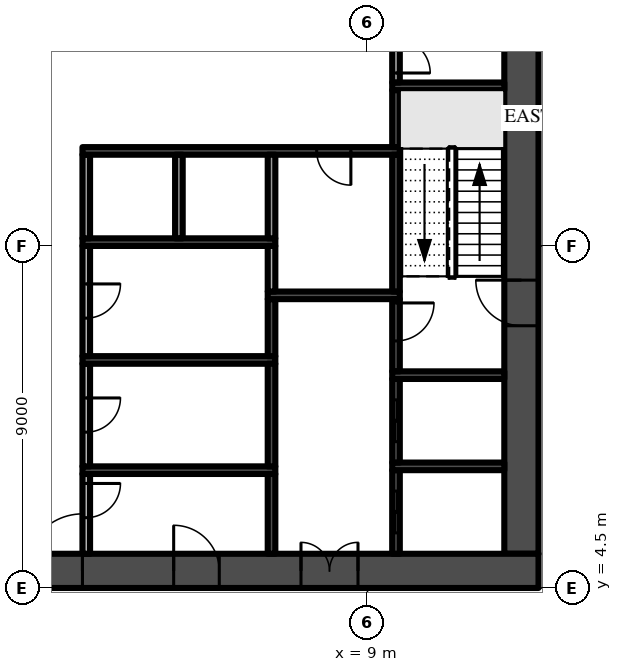
"""IFC4 building model, lengths in metres.
Left out: names, types, materials, properties, quantities, classifications, styles, units other than length and angle.
Written with IfcOpenShell. Run it as: python <this file> out.ifc"""

import sys

from ifc_helpers import new_model, si_unit, direction, frame, frame_2d, origin, place, context, subcontext, project, spatial, rectangle, extrude, element, fill, save


model = new_model("IFC4")
c1 = context("Model", 3, precision=1e-05, world=origin(), true_north=direction((0.0, 1.0)))
c2 = subcontext(c1, "Body", "Model", "MODEL_VIEW")
j1 = project(units=[si_unit("LENGTHUNIT", "METRE"), si_unit("PLANEANGLEUNIT", "RADIAN")], contexts=[c1])
p1 = place(None, origin())
s1 = spatial("IfcSite", under=j1, at=p1, CompositionType="ELEMENT")
p2 = place(p1, origin())
s2 = spatial("IfcBuilding", under=s1, at=p2, CompositionType="ELEMENT")
p3 = place(p2, frame((0.0, 0.0, 6.0)))
s3 = spatial("IfcBuildingStorey", under=s2, at=p3, CompositionType="ELEMENT", Elevation=6.0)
p4 = place(p3, frame((-13.5, 4.95, -0.4), z_axis=(0.0, 0.0, 1.0), x_axis=(1.0, 0.0, 0.0)))
e1 = element("IfcWall", 1, at=p4, inside=s3, PredefinedType="SHEAR", context=c2, shape_type="SweptSolid", body=[
    extrude(rectangle(XDim=27.0, YDim=0.9, at=frame_2d((13.5, 0.0))), origin(), (0.0, 0.0, 1.0), 4.55),
])
p5 = place(p4, frame((12.0, 0.0, 0.4)))
e2 = element("IfcOpeningElement", 2, at=p5, cuts=e1, PredefinedType="OPENING", context=c2, shape_type="SweptSolid", body=[
    extrude(rectangle(XDim=3.0, YDim=2.4, at=frame_2d((1.5, 1.2))), frame((0.0, 0.46, 0.0), z_axis=(0.0, -1.0, 0.0), x_axis=(1.0, 0.0, 0.0)), (0.0, 0.0, 1.0), 0.92),
])
p6 = place(p4, frame((4.9, 0.0, 0.4)))
e3 = element("IfcOpeningElement", 3, at=p6, cuts=e1, PredefinedType="OPENING", context=c2, shape_type="SweptSolid", body=[
    extrude(rectangle(XDim=1.2, YDim=2.2, at=frame_2d((0.6, 1.1))), frame((0.0, 0.46, 0.0), z_axis=(0.0, -1.0, 0.0), x_axis=(1.0, 0.0, 0.0)), (0.0, 0.0, 1.0), 0.92),
])
p7 = place(p4, frame((20.75, 0.0, 0.4)))
e4 = element("IfcOpeningElement", 4, at=p7, cuts=e1, PredefinedType="OPENING", context=c2, shape_type="SweptSolid", body=[
    extrude(rectangle(XDim=1.5, YDim=2.2, at=frame_2d((0.75, 1.1))), frame((0.0, 0.46, 0.0), z_axis=(0.0, -1.0, 0.0), x_axis=(1.0, 0.0, 0.0)), (0.0, 0.0, 1.0), 0.92),
])
p8 = place(p4, frame((17.4, 0.0, 0.4)))
e5 = element("IfcOpeningElement", 5, at=p8, cuts=e1, PredefinedType="OPENING", context=c2, shape_type="SweptSolid", body=[
    extrude(rectangle(XDim=1.2, YDim=2.2, at=frame_2d((0.6, 1.1))), frame((0.0, 0.46, 0.0), z_axis=(0.0, -1.0, 0.0), x_axis=(1.0, 0.0, 0.0)), (0.0, 0.0, 1.0), 0.92),
])
p9 = place(p3, frame((13.05, 5.4, -0.4), z_axis=(0.0, 0.0, 1.0), x_axis=(0.0, 1.0, 0.0)))
e6 = element("IfcWall", 6, at=p9, inside=s3, PredefinedType="SHEAR", context=c2, shape_type="SweptSolid", body=[
    extrude(rectangle(XDim=16.2, YDim=0.9, at=frame_2d((8.1, 0.0))), origin(), (0.0, 0.0, 1.0), 4.55),
])
p10 = place(p9, frame((6.0, 0.0, 0.4)))
e7 = element("IfcOpeningElement", 7, at=p10, cuts=e6, PredefinedType="OPENING", context=c2, shape_type="SweptSolid", body=[
    extrude(rectangle(XDim=1.2, YDim=2.2, at=frame_2d((0.6, 1.1))), frame((0.0, 0.46, 0.0), z_axis=(0.0, -1.0, 0.0), x_axis=(1.0, 0.0, 0.0)), (0.0, 0.0, 1.0), 0.92),
])
p11 = place(p3, frame((1.6, 7.5, 0.0), z_axis=(0.0, 0.0, 1.0), x_axis=(0.0, -1.0, 0.0)))
e8 = element("IfcWall", 8, at=p11, inside=s3, PredefinedType="PARTITIONING", context=c2, shape_type="SweptSolid", body=[
    extrude(rectangle(XDim=2.1, YDim=0.2, at=frame_2d((1.05, 0.0))), origin(), (0.0, 0.0, 1.0), 4.15),
])
p12 = place(p11, frame((0.25, 0.0, 0.0)))
e9 = element("IfcOpeningElement", 9, at=p12, cuts=e8, PredefinedType="OPENING", context=c2, shape_type="SweptSolid", body=[
    extrude(rectangle(XDim=0.9, YDim=2.1, at=frame_2d((0.45, 1.05))), frame((0.0, 0.11, 0.0), z_axis=(0.0, -1.0, 0.0), x_axis=(1.0, 0.0, 0.0)), (0.0, 0.0, 1.0), 0.22),
])
p13 = place(p3, frame((1.5, 7.6, 0.0), z_axis=(0.0, 0.0, 1.0), x_axis=(1.0, 0.0, 0.0)))
e10 = element("IfcWall", 10, at=p13, inside=s3, PredefinedType="SHEAR", context=c2, shape_type="SweptSolid", body=[
    extrude(rectangle(XDim=5.075, YDim=0.2, at=frame_2d((2.538, 0.0))), origin(), (0.0, 0.0, 1.0), 4.15),
])
p14 = place(p3, frame((1.6, 10.4, 0.0), z_axis=(0.0, 0.0, 1.0), x_axis=(0.0, -1.0, 0.0)))
e11 = element("IfcWall", 11, at=p14, inside=s3, PredefinedType="PARTITIONING", context=c2, shape_type="SweptSolid", body=[
    extrude(rectangle(XDim=2.7, YDim=0.2, at=frame_2d((1.35, 0.0))), origin(), (0.0, 0.0, 1.0), 4.15),
])
p15 = place(p14, frame((0.9, 0.0, 0.0)))
e12 = element("IfcOpeningElement", 12, at=p15, cuts=e11, PredefinedType="OPENING", context=c2, shape_type="SweptSolid", body=[
    extrude(rectangle(XDim=0.9, YDim=2.1, at=frame_2d((0.45, 1.05))), frame((0.0, 0.11, 0.0), z_axis=(0.0, -1.0, 0.0), x_axis=(1.0, 0.0, 0.0)), (0.0, 0.0, 1.0), 0.22),
])
p16 = place(p3, frame((1.5, 10.5, 0.0), z_axis=(0.0, 0.0, 1.0), x_axis=(1.0, 0.0, 0.0)))
e13 = element("IfcWall", 13, at=p16, inside=s3, PredefinedType="SHEAR", context=c2, shape_type="SweptSolid", body=[
    extrude(rectangle(XDim=5.075, YDim=0.2, at=frame_2d((2.538, 0.0))), origin(), (0.0, 0.0, 1.0), 4.15),
])
p17 = place(p3, frame((1.6, 13.5, 0.0), z_axis=(0.0, 0.0, 1.0), x_axis=(0.0, -1.0, 0.0)))
e14 = element("IfcWall", 14, at=p17, inside=s3, PredefinedType="PARTITIONING", context=c2, shape_type="SweptSolid", body=[
    extrude(rectangle(XDim=2.9, YDim=0.2, at=frame_2d((1.45, 0.0))), origin(), (0.0, 0.0, 1.0), 4.15),
])
p18 = place(p17, frame((1.0, 0.0, 0.0)))
e15 = element("IfcOpeningElement", 15, at=p18, cuts=e14, PredefinedType="OPENING", context=c2, shape_type="SweptSolid", body=[
    extrude(rectangle(XDim=0.9, YDim=2.1, at=frame_2d((0.45, 1.05))), frame((0.0, 0.11, 0.0), z_axis=(0.0, -1.0, 0.0), x_axis=(1.0, 0.0, 0.0)), (0.0, 0.0, 1.0), 0.22),
])
p19 = place(p3, frame((1.5, 13.6, 0.0), z_axis=(0.0, 0.0, 1.0), x_axis=(1.0, 0.0, 0.0)))
e16 = element("IfcWall", 16, at=p19, inside=s3, PredefinedType="SHEAR", context=c2, shape_type="SweptSolid", body=[
    extrude(rectangle(XDim=5.075, YDim=0.2, at=frame_2d((2.538, 0.0))), origin(), (0.0, 0.0, 1.0), 4.15),
])
p20 = place(p3, frame((1.6, 13.7, 0.0), z_axis=(0.0, 0.0, 1.0), x_axis=(0.0, 1.0, 0.0)))
e17 = element("IfcWall", 17, at=p20, inside=s3, PredefinedType="PARTITIONING", context=c2, shape_type="SweptSolid", body=[
    extrude(rectangle(XDim=2.2, YDim=0.2, at=frame_2d((1.1, 0.0))), origin(), (0.0, 0.0, 1.0), 4.15),
])
p21 = place(p3, frame((9.85, 16.0, 0.0), z_axis=(0.0, 0.0, 1.0), x_axis=(-1.0, 0.0, 0.0)))
e18 = element("IfcWall", 18, at=p21, inside=s3, PredefinedType="SHEAR", context=c2, shape_type="SweptSolid", body=[
    extrude(rectangle(XDim=8.35, YDim=0.2, at=frame_2d((4.175, 0.0))), origin(), (0.0, 0.0, 1.0), 4.15),
])
p22 = place(p21, frame((1.288, 0.0, 0.0)))
e19 = element("IfcOpeningElement", 19, at=p22, cuts=e18, PredefinedType="OPENING", context=c2, shape_type="SweptSolid", body=[
    extrude(rectangle(XDim=0.9, YDim=2.1, at=frame_2d((0.45, 1.05))), frame((0.0, 0.11, 0.0), z_axis=(0.0, -1.0, 0.0), x_axis=(1.0, 0.0, 0.0)), (0.0, 0.0, 1.0), 0.22),
])
p23 = place(p3, frame((4.037, 13.7, 0.0), z_axis=(0.0, 0.0, 1.0), x_axis=(0.0, 1.0, 0.0)))
e20 = element("IfcWall", 20, at=p23, inside=s3, PredefinedType="PARTITIONING", context=c2, shape_type="SweptSolid", body=[
    extrude(rectangle(XDim=2.2, YDim=0.2, at=frame_2d((1.1, 0.0))), origin(), (0.0, 0.0, 1.0), 4.15),
])
p24 = place(p3, frame((6.475, 5.4, 0.0), z_axis=(0.0, 0.0, 1.0), x_axis=(0.0, 1.0, 0.0)))
e21 = element("IfcWall", 21, at=p24, inside=s3, PredefinedType="SHEAR", context=c2, shape_type="SweptSolid", body=[
    extrude(rectangle(XDim=2.1, YDim=0.2, at=frame_2d((1.05, 0.0))), origin(), (0.0, 0.0, 1.0), 4.15),
])
p25 = place(p3, frame((6.475, 7.7, 0.0), z_axis=(0.0, 0.0, 1.0), x_axis=(0.0, 1.0, 0.0)))
e22 = element("IfcWall", 22, at=p25, inside=s3, PredefinedType="SHEAR", context=c2, shape_type="SweptSolid", body=[
    extrude(rectangle(XDim=2.7, YDim=0.2, at=frame_2d((1.35, 0.0))), origin(), (0.0, 0.0, 1.0), 4.15),
])
p26 = place(p3, frame((6.475, 10.6, 0.0), z_axis=(0.0, 0.0, 1.0), x_axis=(0.0, 1.0, 0.0)))
e23 = element("IfcWall", 23, at=p26, inside=s3, PredefinedType="SHEAR", context=c2, shape_type="SweptSolid", body=[
    extrude(rectangle(XDim=1.5, YDim=0.2, at=frame_2d((0.75, 0.0))), origin(), (0.0, 0.0, 1.0), 4.15),
])
p27 = place(p3, frame((6.375, 12.2, 0.0), z_axis=(0.0, 0.0, 1.0), x_axis=(1.0, 0.0, 0.0)))
e24 = element("IfcWall", 24, at=p27, inside=s3, PredefinedType="SHEAR", context=c2, shape_type="SweptSolid", body=[
    extrude(rectangle(XDim=3.475, YDim=0.2, at=frame_2d((1.738, 0.0))), origin(), (0.0, 0.0, 1.0), 4.15),
])
p28 = place(p3, frame((6.475, 12.3, 0.0), z_axis=(0.0, 0.0, 1.0), x_axis=(0.0, 1.0, 0.0)))
e25 = element("IfcWall", 25, at=p28, inside=s3, PredefinedType="PARTITIONING", context=c2, shape_type="SweptSolid", body=[
    extrude(rectangle(XDim=1.2, YDim=0.2, at=frame_2d((0.6, 0.0))), origin(), (0.0, 0.0, 1.0), 4.15),
])
p29 = place(p3, frame((6.475, 13.7, 0.0), z_axis=(0.0, 0.0, 1.0), x_axis=(0.0, 1.0, 0.0)))
e26 = element("IfcWall", 26, at=p29, inside=s3, PredefinedType="PARTITIONING", context=c2, shape_type="SweptSolid", body=[
    extrude(rectangle(XDim=2.2, YDim=0.2, at=frame_2d((1.1, 0.0))), origin(), (0.0, 0.0, 1.0), 4.15),
])
p30 = place(p3, frame((9.75, 5.4, 0.0), z_axis=(0.0, 0.0, 1.0), x_axis=(0.0, 1.0, 0.0)))
e27 = element("IfcWall", 27, at=p30, inside=s3, PredefinedType="SHEAR", context=c2, shape_type="SweptSolid", body=[
    extrude(rectangle(XDim=2.2, YDim=0.2, at=frame_2d((1.1, 0.0))), origin(), (0.0, 0.0, 1.0), 4.15),
])
p31 = place(p30, frame((0.55, 0.0, 0.0)))
e28 = element("IfcOpeningElement", 28, at=p31, cuts=e27, PredefinedType="OPENING", context=c2, shape_type="SweptSolid", body=[
    extrude(rectangle(XDim=1.1, YDim=2.1, at=frame_2d((0.55, 1.05))), frame((0.0, 0.11, 0.0), z_axis=(0.0, -1.0, 0.0), x_axis=(1.0, 0.0, 0.0)), (0.0, 0.0, 1.0), 0.22),
])
p32 = place(p3, frame((9.65, 7.7, 0.0), z_axis=(0.0, 0.0, 1.0), x_axis=(1.0, 0.0, 0.0)))
e29 = element("IfcWall", 29, at=p32, inside=s3, PredefinedType="SHEAR", context=c2, shape_type="SweptSolid", body=[
    extrude(rectangle(XDim=2.95, YDim=0.2, at=frame_2d((1.475, 0.0))), origin(), (0.0, 0.0, 1.0), 4.15),
])
p33 = place(p3, frame((9.75, 7.8, 0.0), z_axis=(0.0, 0.0, 1.0), x_axis=(0.0, 1.0, 0.0)))
e30 = element("IfcWall", 30, at=p33, inside=s3, PredefinedType="SHEAR", context=c2, shape_type="SweptSolid", body=[
    extrude(rectangle(XDim=2.2, YDim=0.2, at=frame_2d((1.1, 0.0))), origin(), (0.0, 0.0, 1.0), 4.15),
])
p34 = place(p33, frame((0.55, 0.0, 0.0)))
e31 = element("IfcOpeningElement", 31, at=p34, cuts=e30, PredefinedType="OPENING", context=c2, shape_type="SweptSolid", body=[
    extrude(rectangle(XDim=1.1, YDim=2.1, at=frame_2d((0.55, 1.05))), frame((0.0, 0.11, 0.0), z_axis=(0.0, -1.0, 0.0), x_axis=(1.0, 0.0, 0.0)), (0.0, 0.0, 1.0), 0.22),
])
p35 = place(p3, frame((9.65, 10.1, 0.0), z_axis=(0.0, 0.0, 1.0), x_axis=(1.0, 0.0, 0.0)))
e32 = element("IfcWall", 32, at=p35, inside=s3, PredefinedType="SHEAR", context=c2, shape_type="SweptSolid", body=[
    extrude(rectangle(XDim=2.95, YDim=0.2, at=frame_2d((1.475, 0.0))), origin(), (0.0, 0.0, 1.0), 4.15),
])
p36 = place(p3, frame((9.75, 12.1, 0.0), z_axis=(0.0, 0.0, 1.0), x_axis=(0.0, -1.0, 0.0)))
e33 = element("IfcWall", 33, at=p36, inside=s3, PredefinedType="SHEAR", context=c2, shape_type="SweptSolid", body=[
    extrude(rectangle(XDim=1.9, YDim=0.2, at=frame_2d((0.95, 0.0))), origin(), (0.0, 0.0, 1.0), 4.15),
])
p37 = place(p36, frame((0.1, 0.0, 0.0)))
e34 = element("IfcOpeningElement", 34, at=p37, cuts=e33, PredefinedType="OPENING", context=c2, shape_type="SweptSolid", body=[
    extrude(rectangle(XDim=1.0, YDim=2.2, at=frame_2d((0.5, 1.1))), frame((0.0, 0.11, 0.0), z_axis=(0.0, -1.0, 0.0), x_axis=(1.0, 0.0, 0.0)), (0.0, 0.0, 1.0), 0.22),
])
p38 = place(p3, frame((9.75, 12.3, 0.0), z_axis=(0.0, 0.0, 1.0), x_axis=(0.0, 1.0, 0.0)))
e35 = element("IfcWall", 35, at=p38, inside=s3, PredefinedType="SHEAR", context=c2, shape_type="SweptSolid", body=[
    extrude(rectangle(XDim=3.6, YDim=0.2, at=frame_2d((1.8, 0.0))), origin(), (0.0, 0.0, 1.0), 4.15),
])
p39 = place(p3, frame((9.75, 16.1, 0.0), z_axis=(0.0, 0.0, 1.0), x_axis=(0.0, 1.0, 0.0)))
e36 = element("IfcWall", 36, at=p39, inside=s3, PredefinedType="SHEAR", context=c2, shape_type="SweptSolid", body=[
    extrude(rectangle(XDim=1.5, YDim=0.2, at=frame_2d((0.75, 0.0))), origin(), (0.0, 0.0, 1.0), 4.15),
])
p40 = place(p3, frame((9.65, 17.7, 0.0), z_axis=(0.0, 0.0, 1.0), x_axis=(1.0, 0.0, 0.0)))
e37 = element("IfcWall", 37, at=p40, inside=s3, PredefinedType="SHEAR", context=c2, shape_type="SweptSolid", body=[
    extrude(rectangle(XDim=2.95, YDim=0.2, at=frame_2d((1.475, 0.0))), origin(), (0.0, 0.0, 1.0), 4.15),
])
p41 = place(p3, frame((9.75, 19.2, 0.0), z_axis=(0.0, 0.0, 1.0), x_axis=(0.0, -1.0, 0.0)))
e38 = element("IfcWall", 38, at=p41, inside=s3, PredefinedType="PARTITIONING", context=c2, shape_type="SweptSolid", body=[
    extrude(rectangle(XDim=1.4, YDim=0.2, at=frame_2d((0.7, 0.0))), origin(), (0.0, 0.0, 1.0), 4.15),
])
p42 = place(p41, frame((0.25, 0.0, 0.0)))
e39 = element("IfcOpeningElement", 39, at=p42, cuts=e38, PredefinedType="OPENING", context=c2, shape_type="SweptSolid", body=[
    extrude(rectangle(XDim=0.9, YDim=2.1, at=frame_2d((0.45, 1.05))), frame((0.0, 0.11, 0.0), z_axis=(0.0, -1.0, 0.0), x_axis=(1.0, 0.0, 0.0)), (0.0, 0.0, 1.0), 0.22),
])
p43 = place(p5, frame((3.0, 0.0, 0.0), z_axis=(0.0, 0.0, 1.0), x_axis=(-1.0, 0.0, 0.0)))
e40 = element("IfcDoor", 40, at=p43, inside=s3, OperationType="DOUBLE_DOOR_SINGLE_SWING", PredefinedType="DOOR", context=c2, shape_type="SweptSolid", body=[
    extrude(rectangle(XDim=3.0, YDim=2.4, at=frame_2d((1.5, 1.2))), frame((0.0, 0.025, 0.0), z_axis=(0.0, -1.0, 0.0), x_axis=(1.0, 0.0, 0.0)), (0.0, 0.0, 1.0), 0.05),
])
fill(e2, e40)
p44 = place(p10, frame((1.2, 0.0, 0.0), z_axis=(0.0, 0.0, 1.0), x_axis=(-1.0, 0.0, 0.0)))
e41 = element("IfcDoor", 41, at=p44, inside=s3, OperationType="SINGLE_SWING_LEFT", PredefinedType="DOOR", context=c2, shape_type="SweptSolid", body=[
    extrude(rectangle(XDim=1.2, YDim=2.2, at=frame_2d((0.6, 1.1))), frame((0.0, 0.025, 0.0), z_axis=(0.0, -1.0, 0.0), x_axis=(1.0, 0.0, 0.0)), (0.0, 0.0, 1.0), 0.05),
])
fill(e7, e41)
p45 = place(p7, frame((1.5, 0.0, 0.0), z_axis=(0.0, 0.0, 1.0), x_axis=(-1.0, 0.0, 0.0)))
e42 = element("IfcDoor", 42, at=p45, inside=s3, OperationType="DOUBLE_DOOR_SINGLE_SWING", PredefinedType="DOOR", context=c2, shape_type="SweptSolid", body=[
    extrude(rectangle(XDim=1.5, YDim=2.2, at=frame_2d((0.75, 1.1))), frame((0.0, 0.025, 0.0), z_axis=(0.0, -1.0, 0.0), x_axis=(1.0, 0.0, 0.0)), (0.0, 0.0, 1.0), 0.05),
])
fill(e4, e42)
p46 = place(p8, frame((1.2, 0.0, 0.0), z_axis=(0.0, 0.0, 1.0), x_axis=(-1.0, 0.0, 0.0)))
e43 = element("IfcDoor", 43, at=p46, inside=s3, OperationType="SINGLE_SWING_RIGHT", PredefinedType="DOOR", context=c2, shape_type="SweptSolid", body=[
    extrude(rectangle(XDim=1.2, YDim=2.2, at=frame_2d((0.6, 1.1))), frame((0.0, 0.025, 0.0), z_axis=(0.0, -1.0, 0.0), x_axis=(1.0, 0.0, 0.0)), (0.0, 0.0, 1.0), 0.05),
])
fill(e5, e43)
p47 = place(p37, origin())
e44 = element("IfcDoor", 44, at=p47, inside=s3, OperationType="SINGLE_SWING_LEFT", PredefinedType="DOOR", context=c2, shape_type="SweptSolid", body=[
    extrude(rectangle(XDim=1.0, YDim=2.2, at=frame_2d((0.5, 1.1))), frame((0.0, 0.025, 0.0), z_axis=(0.0, -1.0, 0.0), x_axis=(1.0, 0.0, 0.0)), (0.0, 0.0, 1.0), 0.05),
])
fill(e34, e44)
p48 = place(p31, origin())
e45 = element("IfcDoor", 45, at=p48, inside=s3, OperationType="SLIDING_TO_RIGHT", PredefinedType="DOOR", context=c2, shape_type="SweptSolid", body=[
    extrude(rectangle(XDim=1.1, YDim=2.1, at=frame_2d((0.55, 1.05))), frame((0.0, 0.025, 0.0), z_axis=(0.0, -1.0, 0.0), x_axis=(1.0, 0.0, 0.0)), (0.0, 0.0, 1.0), 0.05),
])
fill(e28, e45)
p49 = place(p34, origin())
e46 = element("IfcDoor", 46, at=p49, inside=s3, OperationType="SLIDING_TO_RIGHT", PredefinedType="DOOR", context=c2, shape_type="SweptSolid", body=[
    extrude(rectangle(XDim=1.1, YDim=2.1, at=frame_2d((0.55, 1.05))), frame((0.0, 0.025, 0.0), z_axis=(0.0, -1.0, 0.0), x_axis=(1.0, 0.0, 0.0)), (0.0, 0.0, 1.0), 0.05),
])
fill(e31, e46)
p50 = place(p12, origin())
e47 = element("IfcDoor", 47, at=p50, inside=s3, OperationType="SINGLE_SWING_LEFT", PredefinedType="DOOR", context=c2, shape_type="SweptSolid", body=[
    extrude(rectangle(XDim=0.9, YDim=2.1, at=frame_2d((0.45, 1.05))), frame((0.0, 0.025, 0.0), z_axis=(0.0, -1.0, 0.0), x_axis=(1.0, 0.0, 0.0)), (0.0, 0.0, 1.0), 0.05),
])
fill(e9, e47)
p51 = place(p15, origin())
e48 = element("IfcDoor", 48, at=p51, inside=s3, OperationType="SINGLE_SWING_LEFT", PredefinedType="DOOR", context=c2, shape_type="SweptSolid", body=[
    extrude(rectangle(XDim=0.9, YDim=2.1, at=frame_2d((0.45, 1.05))), frame((0.0, 0.025, 0.0), z_axis=(0.0, -1.0, 0.0), x_axis=(1.0, 0.0, 0.0)), (0.0, 0.0, 1.0), 0.05),
])
fill(e12, e48)
p52 = place(p18, origin())
e49 = element("IfcDoor", 49, at=p52, inside=s3, OperationType="SINGLE_SWING_LEFT", PredefinedType="DOOR", context=c2, shape_type="SweptSolid", body=[
    extrude(rectangle(XDim=0.9, YDim=2.1, at=frame_2d((0.45, 1.05))), frame((0.0, 0.025, 0.0), z_axis=(0.0, -1.0, 0.0), x_axis=(1.0, 0.0, 0.0)), (0.0, 0.0, 1.0), 0.05),
])
fill(e15, e49)
p53 = place(p22, origin())
e50 = element("IfcDoor", 50, at=p53, inside=s3, OperationType="SINGLE_SWING_LEFT", PredefinedType="DOOR", context=c2, shape_type="SweptSolid", body=[
    extrude(rectangle(XDim=0.9, YDim=2.1, at=frame_2d((0.45, 1.05))), frame((0.0, 0.025, 0.0), z_axis=(0.0, -1.0, 0.0), x_axis=(1.0, 0.0, 0.0)), (0.0, 0.0, 1.0), 0.05),
])
fill(e19, e50)
p54 = place(p42, origin())
e51 = element("IfcDoor", 51, at=p54, inside=s3, OperationType="SINGLE_SWING_RIGHT", PredefinedType="DOOR", context=c2, shape_type="SweptSolid", body=[
    extrude(rectangle(XDim=0.9, YDim=2.1, at=frame_2d((0.45, 1.05))), frame((0.0, 0.025, 0.0), z_axis=(0.0, -1.0, 0.0), x_axis=(1.0, 0.0, 0.0)), (0.0, 0.0, 1.0), 0.05),
])
fill(e39, e51)
save(model, sys.argv[1])
